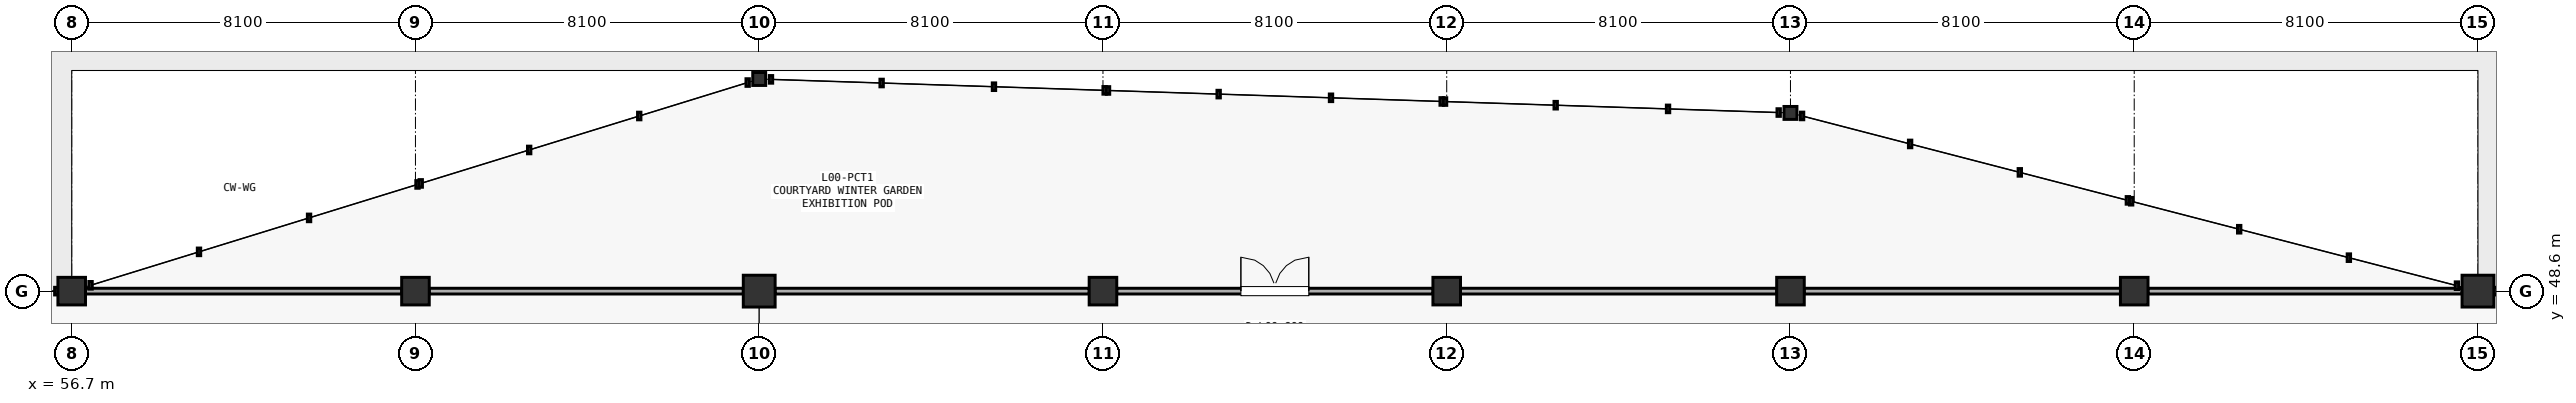
"""IFC4 building model, lengths in metres.
Left out: names, types, materials, properties, quantities, classifications, styles, units other than length and angle.
Written with IfcOpenShell. Run it as: python <this file> out.ifc"""

import sys

from ifc_helpers import new_model, si_unit, direction, frame, frame_2d, origin, origin_2d, place, context, subcontext, project, spatial, rectangle, hollow_rectangle, circle, extrude, element, fill, save


model = new_model("IFC4")
c1 = context("Model", 3, precision=1e-05, world=origin(), true_north=direction((0.0, 1.0)))
c2 = subcontext(c1, "Body", "Model", "MODEL_VIEW")
j1 = project(units=[si_unit("LENGTHUNIT", "METRE"), si_unit("PLANEANGLEUNIT", "RADIAN")], contexts=[c1])
p1 = place(None, origin())
s1 = spatial("IfcSite", under=j1, at=p1, CompositionType="ELEMENT")
p2 = place(p1, origin())
s2 = spatial("IfcBuilding", under=s1, at=p2, CompositionType="ELEMENT")
p3 = place(p2, origin())
s3 = spatial("IfcBuildingStorey", under=s2, at=p3, CompositionType="ELEMENT", Elevation=0.0)
for number, where, z_axis, x_axis in (
    (1, (56.7, 48.6, 0.0), (0.0, 0.0, 1.0), (1.0, 0.0, 0.0)),
    (2, (64.8, 48.6, 0.0), (0.0, 0.0, 1.0), (1.0, 0.0, 0.0)),
):
    element("IfcColumn", number, at=place(p3, frame(where, z_axis=z_axis, x_axis=x_axis)), inside=s3, PredefinedType="COLUMN", context=c2, shape_type="SweptSolid", body=[
        extrude(rectangle(XDim=0.65, YDim=0.65, at=origin_2d()), origin(), (0.0, 0.0, 1.0), 5.1),
    ])
p4 = place(p3, frame((72.9, 48.6, 0.0), z_axis=(0.0, 0.0, 1.0), x_axis=(1.0, 0.0, 0.0)))
e3 = element("IfcColumn", 3, at=p4, inside=s3, PredefinedType="COLUMN", context=c2, shape_type="SweptSolid", body=[
    extrude(circle(Radius=0.375, at=origin_2d()), origin(), (0.0, 0.0, 1.0), 5.1),
])
for number, where, z_axis, x_axis in (
    (4, (81.0, 48.6, 0.0), (0.0, 0.0, 1.0), (1.0, 0.0, 0.0)),
    (5, (89.1, 48.6, 0.0), (0.0, 0.0, 1.0), (1.0, 0.0, 0.0)),
    (6, (97.2, 48.6, 0.0), (0.0, 0.0, 1.0), (1.0, 0.0, 0.0)),
    (7, (105.3, 48.6, 0.0), (0.0, 0.0, 1.0), (1.0, 0.0, 0.0)),
):
    element("IfcColumn", number, at=place(p3, frame(where, z_axis=z_axis, x_axis=x_axis)), inside=s3, PredefinedType="COLUMN", context=c2, shape_type="SweptSolid", body=[
        extrude(rectangle(XDim=0.65, YDim=0.65, at=origin_2d()), origin(), (0.0, 0.0, 1.0), 5.1),
    ])
p5 = place(p3, frame((113.4, 48.6, 0.0), z_axis=(0.0, 0.0, 1.0), x_axis=(1.0, 0.0, 0.0)))
e8 = element("IfcColumn", 8, at=p5, inside=s3, PredefinedType="COLUMN", context=c2, shape_type="SweptSolid", body=[
    extrude(circle(Radius=0.375, at=origin_2d()), origin(), (0.0, 0.0, 1.0), 5.1),
])
for number, where, z_axis, x_axis in (
    (9, (72.9, 53.6, 0.0), (0.0, 0.0, 1.0), (1.0, 0.0, 0.0)),
    (10, (97.2, 52.8, 0.0), (0.0, 0.0, 1.0), (1.0, 0.0, 0.0)),
):
    element("IfcColumn", number, at=place(p3, frame(where, z_axis=z_axis, x_axis=x_axis)), inside=s3, PredefinedType="COLUMN", context=c2, shape_type="SweptSolid", body=[
        extrude(hollow_rectangle(XDim=0.305, YDim=0.305, WallThickness=0.013, InnerFilletRadius=0.013, OuterFilletRadius=0.025, at=origin_2d()), origin(), (0.0, 0.0, 1.0), 5.1),
    ])
p6 = place(p3, frame((57.023, 48.6, 0.0), z_axis=(0.0, 0.0, 1.0), x_axis=(1.0, 0.0, 0.0)))
e11 = element("IfcWall", 11, at=p6, inside=s3, PredefinedType="PARTITIONING", context=c2, shape_type="SweptSolid", body=[
    extrude(rectangle(XDim=7.454, YDim=0.135, at=frame_2d((3.727, 0.0))), origin(), (0.0, 0.0, 1.0), 4.412),
])
p7 = place(p3, frame((65.123, 48.6, 0.0), z_axis=(0.0, 0.0, 1.0), x_axis=(1.0, 0.0, 0.0)))
e12 = element("IfcWall", 12, at=p7, inside=s3, PredefinedType="PARTITIONING", context=c2, shape_type="SweptSolid", body=[
    extrude(rectangle(XDim=7.404, YDim=0.135, at=frame_2d((3.702, 0.0))), origin(), (0.0, 0.0, 1.0), 4.464),
])
p8 = place(p3, frame((73.273, 48.6, 0.0), z_axis=(0.0, 0.0, 1.0), x_axis=(1.0, 0.0, 0.0)))
e13 = element("IfcWall", 13, at=p8, inside=s3, PredefinedType="PARTITIONING", context=c2, shape_type="SweptSolid", body=[
    extrude(rectangle(XDim=7.404, YDim=0.135, at=frame_2d((3.702, 0.0))), origin(), (0.0, 0.0, 1.0), 4.407),
])
p9 = place(p3, frame((81.323, 48.6, 0.0), z_axis=(0.0, 0.0, 1.0), x_axis=(1.0, 0.0, 0.0)))
e14 = element("IfcWall", 14, at=p9, inside=s3, PredefinedType="PARTITIONING", context=c2, shape_type="SweptSolid", body=[
    extrude(rectangle(XDim=7.454, YDim=0.135, at=frame_2d((3.727, 0.0))), origin(), (0.0, 0.0, 1.0), 4.505),
])
p10 = place(p9, frame((2.927, 0.0, 0.0)))
e15 = element("IfcOpeningElement", 15, at=p10, cuts=e14, PredefinedType="OPENING", context=c2, shape_type="SweptSolid", body=[
    extrude(rectangle(XDim=1.6, YDim=2.2, at=frame_2d((0.8, 1.1))), frame((0.0, 0.078, 0.0), z_axis=(0.0, -1.0, 0.0), x_axis=(1.0, 0.0, 0.0)), (0.0, 0.0, 1.0), 0.155),
])
p11 = place(p3, frame((89.423, 48.6, 0.0), z_axis=(0.0, 0.0, 1.0), x_axis=(1.0, 0.0, 0.0)))
e16 = element("IfcWall", 16, at=p11, inside=s3, PredefinedType="PARTITIONING", context=c2, shape_type="SweptSolid", body=[
    extrude(rectangle(XDim=7.454, YDim=0.135, at=frame_2d((3.727, 0.0))), origin(), (0.0, 0.0, 1.0), 4.556),
])
p12 = place(p3, frame((97.523, 48.6, 0.0), z_axis=(0.0, 0.0, 1.0), x_axis=(1.0, 0.0, 0.0)))
e17 = element("IfcWall", 17, at=p12, inside=s3, PredefinedType="PARTITIONING", context=c2, shape_type="SweptSolid", body=[
    extrude(rectangle(XDim=7.454, YDim=0.135, at=frame_2d((3.727, 0.0))), origin(), (0.0, 0.0, 1.0), 4.172),
])
p13 = place(p3, frame((105.623, 48.6, 0.0), z_axis=(0.0, 0.0, 1.0), x_axis=(1.0, 0.0, 0.0)))
e18 = element("IfcWall", 18, at=p13, inside=s3, PredefinedType="PARTITIONING", context=c2, shape_type="SweptSolid", body=[
    extrude(rectangle(XDim=7.404, YDim=0.135, at=frame_2d((3.702, 0.0))), origin(), (0.0, 0.0, 1.0), 4.273),
])
p14 = place(p10, origin())
e19 = element("IfcDoor", 19, at=p14, inside=s3, OperationType="DOUBLE_SWING_LEFT", PredefinedType="DOOR", context=c2, shape_type="SweptSolid", body=[
    extrude(rectangle(XDim=1.6, YDim=2.2, at=frame_2d((0.8, 1.1))), frame((0.0, 0.025, 0.0), z_axis=(0.0, -1.0, 0.0), x_axis=(1.0, 0.0, 0.0)), (0.0, 0.0, 1.0), 0.05),
])
fill(e15, e19)
save(model, sys.argv[1])
